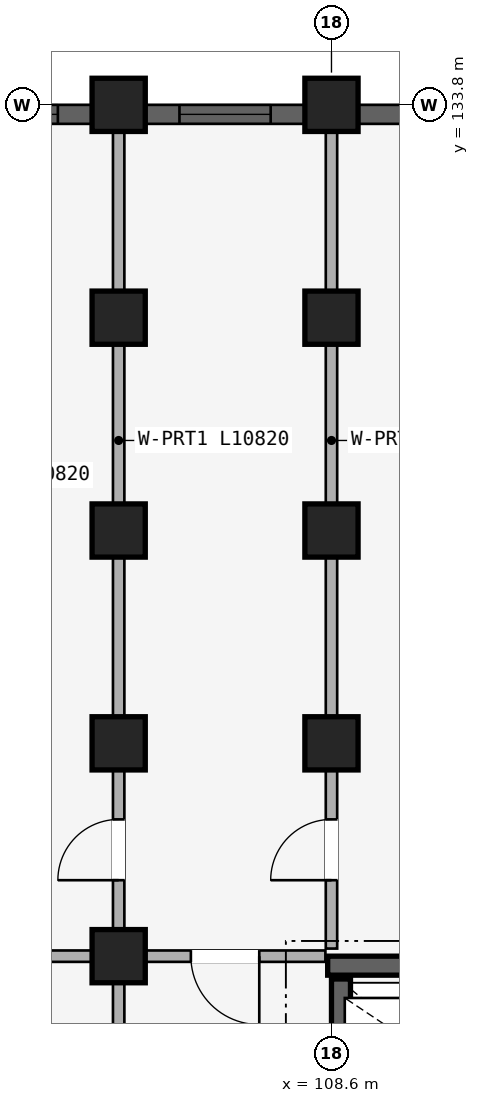
"""IFC4 building model, lengths in metres.
Left out: names, types, materials, properties, quantities, classifications, styles, units other than length and angle.
Written with IfcOpenShell. Run it as: python <this file> out.ifc"""

import sys

from ifc_helpers import new_model, si_unit, direction, frame, frame_2d, origin, origin_2d, place, context, subcontext, project, spatial, rectangle, extrude, element, fill, save


model = new_model("IFC4")
c1 = context("Model", 3, precision=1e-05, world=origin(), true_north=direction((0.0, 1.0)))
c2 = subcontext(c1, "Body", "Model", "MODEL_VIEW")
j1 = project(units=[si_unit("LENGTHUNIT", "METRE"), si_unit("PLANEANGLEUNIT", "RADIAN")], contexts=[c1])
p1 = place(None, origin())
s1 = spatial("IfcSite", under=j1, at=p1, CompositionType="ELEMENT")
p2 = place(p1, origin())
s2 = spatial("IfcBuilding", under=s1, at=p2, CompositionType="ELEMENT")
p3 = place(p2, frame((0.0, 0.0, 18.15)))
s3 = spatial("IfcBuildingStorey", under=s2, at=p3, CompositionType="ELEMENT", Elevation=18.15)
p4 = place(p3, frame((111.35, 122.475, 0.0), z_axis=(0.0, 0.0, 1.0), x_axis=(-1.0, 0.0, 0.0)))
e1 = element("IfcWall", 1, at=p4, inside=s3, PredefinedType="SHEAR", context=c2, shape_type="SweptSolid", body=[
    extrude(rectangle(XDim=2.8, YDim=0.25, at=frame_2d((1.4, 0.0))), origin(), (0.0, 0.0, 1.0), 2.93),
])
p5 = place(p3, frame((108.725, 120.15, 0.0), z_axis=(0.0, 0.0, 1.0), x_axis=(0.0, 1.0, 0.0)))
e2 = element("IfcWall", 2, at=p5, inside=s3, PredefinedType="SHEAR", context=c2, shape_type="SweptSolid", body=[
    extrude(rectangle(XDim=2.15, YDim=0.25, at=frame_2d((1.075, 0.0))), origin(), (0.0, 0.0, 1.0), 2.93),
])
for number, where, z_axis, x_axis in (
    (3, (108.6, 125.4, 0.0), (0.0, 0.0, 1.0), (1.0, 0.0, 0.0)),
    (4, (108.6, 128.2, 0.0), (0.0, 0.0, 1.0), (1.0, 0.0, 0.0)),
    (5, (108.6, 131.0, 0.0), (0.0, 0.0, 1.0), (1.0, 0.0, 0.0)),
    (6, (108.6, 133.8, 0.0), (0.0, 0.0, 1.0), (1.0, 0.0, 0.0)),
    (7, (105.8, 122.6, 0.0), (0.0, 0.0, 1.0), (1.0, 0.0, 0.0)),
    (8, (105.8, 125.4, 0.0), (0.0, 0.0, 1.0), (1.0, 0.0, 0.0)),
    (9, (105.8, 128.2, 0.0), (0.0, 0.0, 1.0), (1.0, 0.0, 0.0)),
    (10, (105.8, 131.0, 0.0), (0.0, 0.0, 1.0), (1.0, 0.0, 0.0)),
    (11, (105.8, 133.8, 0.0), (0.0, 0.0, 1.0), (1.0, 0.0, 0.0)),
):
    element("IfcColumn", number, at=place(p3, frame(where, z_axis=z_axis, x_axis=x_axis)), inside=s3, PredefinedType="COLUMN", context=c2, shape_type="SweptSolid", body=[
        extrude(rectangle(XDim=0.7, YDim=0.7, at=origin_2d()), origin(), (0.0, 0.0, 1.0), 2.93),
    ])
p6 = place(p3, frame((108.52, 122.6, 0.0), z_axis=(0.0, 0.0, 1.0), x_axis=(-1.0, 0.0, 0.0)))
e12 = element("IfcWall", 12, at=p6, inside=s3, PredefinedType="PLUMBINGWALL", context=c2, shape_type="SweptSolid", body=[
    extrude(rectangle(XDim=2.64, YDim=0.15, at=frame_2d((1.32, 0.0))), origin(), (0.0, 0.0, 1.0), 2.372),
])
p7 = place(p6, frame((0.87, 0.0, 0.0)))
e13 = element("IfcOpeningElement", 13, at=p7, cuts=e12, PredefinedType="OPENING", context=c2, shape_type="SweptSolid", body=[
    extrude(rectangle(XDim=0.9, YDim=2.1, at=frame_2d((0.45, 1.05))), frame((0.0, 0.085, 0.0), z_axis=(0.0, -1.0, 0.0), x_axis=(1.0, 0.0, 0.0)), (0.0, 0.0, 1.0), 0.17),
])
p8 = place(p3, frame((105.72, 122.6, 0.0), z_axis=(0.0, 0.0, 1.0), x_axis=(-1.0, 0.0, 0.0)))
e14 = element("IfcWall", 14, at=p8, inside=s3, PredefinedType="PLUMBINGWALL", context=c2, shape_type="SweptSolid", body=[
    extrude(rectangle(XDim=2.64, YDim=0.15, at=frame_2d((1.32, 0.0))), origin(), (0.0, 0.0, 1.0), 2.372),
])
p9 = place(p8, frame((0.92, 0.0, 0.0)))
e15 = element("IfcOpeningElement", 15, at=p9, cuts=e14, PredefinedType="OPENING", context=c2, shape_type="SweptSolid", body=[
    extrude(rectangle(XDim=0.8, YDim=2.1, at=frame_2d((0.4, 1.05))), frame((0.0, 0.085, 0.0), z_axis=(0.0, -1.0, 0.0), x_axis=(1.0, 0.0, 0.0)), (0.0, 0.0, 1.0), 0.17),
])
p10 = place(p3, frame((108.6, 122.7, 0.0), z_axis=(0.0, 0.0, 1.0), x_axis=(0.0, 1.0, 0.0)))
e16 = element("IfcWall", 16, at=p10, inside=s3, PredefinedType="PARTITIONING", context=c2, shape_type="SweptSolid", body=[
    extrude(rectangle(XDim=10.82, YDim=0.15, at=frame_2d((5.41, 0.0))), origin(), (0.0, 0.0, 1.0), 2.372),
])
p11 = place(p10, frame((0.899, 0.0, 0.0)))
e17 = element("IfcOpeningElement", 17, at=p11, cuts=e16, PredefinedType="OPENING", context=c2, shape_type="SweptSolid", body=[
    extrude(rectangle(XDim=0.8, YDim=2.1, at=frame_2d((0.4, 1.05))), frame((0.0, 0.085, 0.0), z_axis=(0.0, -1.0, 0.0), x_axis=(1.0, 0.0, 0.0)), (0.0, 0.0, 1.0), 0.17),
])
p12 = place(p3, frame((105.8, 116.05, 0.0), z_axis=(0.0, 0.0, 1.0), x_axis=(0.0, 1.0, 0.0)))
e18 = element("IfcWall", 18, at=p12, inside=s3, PredefinedType="PARTITIONING", context=c2, shape_type="SweptSolid", body=[
    extrude(rectangle(XDim=6.53, YDim=0.15, at=frame_2d((3.265, 0.0))), origin(), (0.0, 0.0, 1.0), 2.372),
])
p13 = place(p12, frame((2.815, 0.0, 0.0)))
e19 = element("IfcOpeningElement", 19, at=p13, cuts=e18, PredefinedType="OPENING", context=c2, shape_type="SweptSolid", body=[
    extrude(rectangle(XDim=0.9, YDim=2.1, at=frame_2d((0.45, 1.05))), frame((0.0, 0.085, 0.0), z_axis=(0.0, -1.0, 0.0), x_axis=(1.0, 0.0, 0.0)), (0.0, 0.0, 1.0), 0.17),
])
p14 = place(p3, frame((105.8, 122.7, 0.0), z_axis=(0.0, 0.0, 1.0), x_axis=(0.0, 1.0, 0.0)))
e20 = element("IfcWall", 20, at=p14, inside=s3, PredefinedType="PARTITIONING", context=c2, shape_type="SweptSolid", body=[
    extrude(rectangle(XDim=10.82, YDim=0.15, at=frame_2d((5.41, 0.0))), origin(), (0.0, 0.0, 1.0), 2.372),
])
p15 = place(p14, frame((0.899, 0.0, 0.0)))
e21 = element("IfcOpeningElement", 21, at=p15, cuts=e20, PredefinedType="OPENING", context=c2, shape_type="SweptSolid", body=[
    extrude(rectangle(XDim=0.8, YDim=2.1, at=frame_2d((0.4, 1.05))), frame((0.0, 0.085, 0.0), z_axis=(0.0, -1.0, 0.0), x_axis=(1.0, 0.0, 0.0)), (0.0, 0.0, 1.0), 0.17),
])
p16 = place(p3, frame((113.846, 133.675, 0.0), z_axis=(0.0, 0.0, 1.0), x_axis=(-1.0, 0.0, 0.0)))
e22 = element("IfcWall", 22, at=p16, inside=s3, PredefinedType="STANDARD", context=c2, shape_type="SweptSolid", body=[
    extrude(rectangle(XDim=4.893, YDim=0.25, at=frame_2d((2.446, 0.0))), origin(), (0.0, 0.0, 1.0), 2.472),
])
p17 = place(p16, frame((1.971, 0.0, 0.88)))
e23 = element("IfcOpeningElement", 23, at=p17, cuts=e22, PredefinedType="OPENING", context=c2, shape_type="SweptSolid", body=[
    extrude(rectangle(XDim=0.95, YDim=1.35, at=frame_2d((0.475, 0.675))), frame((0.0, 0.135, 0.0), z_axis=(0.0, -1.0, 0.0), x_axis=(1.0, 0.0, 0.0)), (0.0, 0.0, 1.0), 0.27),
])
p18 = place(p3, frame((108.247, 133.675, 0.0), z_axis=(0.0, 0.0, 1.0), x_axis=(-1.0, 0.0, 0.0)))
e24 = element("IfcWall", 24, at=p18, inside=s3, PredefinedType="STANDARD", context=c2, shape_type="SweptSolid", body=[
    extrude(rectangle(XDim=2.093, YDim=0.25, at=frame_2d((1.046, 0.0))), origin(), (0.0, 0.0, 1.0), 2.472),
])
p19 = place(p18, frame((0.447, 0.0, 0.772)))
e25 = element("IfcOpeningElement", 25, at=p19, cuts=e24, PredefinedType="OPENING", context=c2, shape_type="SweptSolid", body=[
    extrude(rectangle(XDim=1.2, YDim=1.5, at=frame_2d((0.6, 0.75))), frame((0.0, 0.135, 0.0), z_axis=(0.0, -1.0, 0.0), x_axis=(1.0, 0.0, 0.0)), (0.0, 0.0, 1.0), 0.27),
])
p20 = place(p3, frame((105.447, 133.675, 0.0), z_axis=(0.0, 0.0, 1.0), x_axis=(-1.0, 0.0, 0.0)))
e26 = element("IfcWall", 26, at=p20, inside=s3, PredefinedType="STANDARD", context=c2, shape_type="SweptSolid", body=[
    extrude(rectangle(XDim=2.093, YDim=0.25, at=frame_2d((1.046, 0.0))), origin(), (0.0, 0.0, 1.0), 2.472),
])
p21 = place(p20, frame((0.447, 0.0, 0.772)))
e27 = element("IfcOpeningElement", 27, at=p21, cuts=e26, PredefinedType="OPENING", context=c2, shape_type="SweptSolid", body=[
    extrude(rectangle(XDim=1.2, YDim=1.5, at=frame_2d((0.6, 0.75))), frame((0.0, 0.135, 0.0), z_axis=(0.0, -1.0, 0.0), x_axis=(1.0, 0.0, 0.0)), (0.0, 0.0, 1.0), 0.27),
])
p22 = place(p19, origin())
e28 = element("IfcWindow", 28, at=p22, inside=s3, PartitioningType="SINGLE_PANEL", PredefinedType="WINDOW", context=c2, shape_type="SweptSolid", body=[
    extrude(rectangle(XDim=1.2, YDim=1.5, at=frame_2d((0.6, 0.75))), frame((0.0, 0.03, 0.0), z_axis=(0.0, -1.0, 0.0), x_axis=(1.0, 0.0, 0.0)), (0.0, 0.0, 1.0), 0.06),
])
fill(e25, e28)
p23 = place(p21, origin())
e29 = element("IfcWindow", 29, at=p23, inside=s3, PartitioningType="SINGLE_PANEL", PredefinedType="WINDOW", context=c2, shape_type="SweptSolid", body=[
    extrude(rectangle(XDim=1.2, YDim=1.5, at=frame_2d((0.6, 0.75))), frame((0.0, 0.03, 0.0), z_axis=(0.0, -1.0, 0.0), x_axis=(1.0, 0.0, 0.0)), (0.0, 0.0, 1.0), 0.06),
])
fill(e27, e29)
p24 = place(p7, frame((0.9, 0.0, 0.0), z_axis=(0.0, 0.0, 1.0), x_axis=(-1.0, 0.0, 0.0)))
e30 = element("IfcDoor", 30, at=p24, inside=s3, OperationType="SINGLE_SWING_RIGHT", PredefinedType="DOOR", context=c2, shape_type="SweptSolid", body=[
    extrude(rectangle(XDim=0.9, YDim=2.1, at=frame_2d((0.45, 1.05))), frame((0.0, 0.025, 0.0), z_axis=(0.0, -1.0, 0.0), x_axis=(1.0, 0.0, 0.0)), (0.0, 0.0, 1.0), 0.05),
])
fill(e13, e30)
p25 = place(p11, origin())
e31 = element("IfcDoor", 31, at=p25, inside=s3, OperationType="SINGLE_SWING_LEFT", PredefinedType="DOOR", context=c2, shape_type="SweptSolid", body=[
    extrude(rectangle(XDim=0.8, YDim=2.1, at=frame_2d((0.4, 1.05))), frame((0.0, 0.025, 0.0), z_axis=(0.0, -1.0, 0.0), x_axis=(1.0, 0.0, 0.0)), (0.0, 0.0, 1.0), 0.05),
])
fill(e17, e31)
p26 = place(p15, frame((0.8, 0.0, 0.0), z_axis=(0.0, 0.0, 1.0), x_axis=(-1.0, 0.0, 0.0)))
e32 = element("IfcDoor", 32, at=p26, inside=s3, OperationType="SINGLE_SWING_RIGHT", PredefinedType="DOOR", context=c2, shape_type="SweptSolid", body=[
    extrude(rectangle(XDim=0.8, YDim=2.1, at=frame_2d((0.4, 1.05))), frame((0.0, 0.025, 0.0), z_axis=(0.0, -1.0, 0.0), x_axis=(1.0, 0.0, 0.0)), (0.0, 0.0, 1.0), 0.05),
])
fill(e21, e32)
save(model, sys.argv[1])
